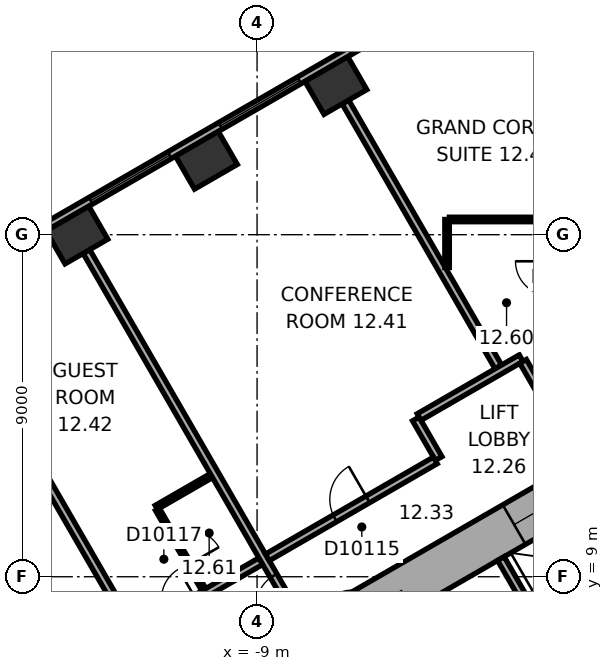
"""IFC4 building model, lengths in metres.
Left out: names, types, materials, properties, quantities, classifications, styles, units other than length and angle.
Written with IfcOpenShell. Run it as: python <this file> out.ifc"""

import sys

from ifc_helpers import new_model, si_unit, direction, frame, frame_2d, origin, origin_2d, place, context, subcontext, project, spatial, rectangle, extrude, element, fill, save


model = new_model("IFC4")
c1 = context("Model", 3, precision=1e-05, world=origin(), true_north=direction((0.0, 1.0)))
c2 = subcontext(c1, "Body", "Model", "MODEL_VIEW")
j1 = project(units=[si_unit("LENGTHUNIT", "METRE"), si_unit("PLANEANGLEUNIT", "RADIAN")], contexts=[c1])
p1 = place(None, origin())
s1 = spatial("IfcSite", under=j1, at=p1, CompositionType="ELEMENT")
p2 = place(p1, origin())
s2 = spatial("IfcBuilding", under=s1, at=p2, CompositionType="ELEMENT")
p3 = place(p2, frame((0.0, 0.0, 60.5)))
s3 = spatial("IfcBuildingStorey", under=s2, at=p3, CompositionType="ELEMENT", Elevation=60.5)
for number, where, z_axis, x_axis in (
    (1, (-6.926, 21.925, 0.0), (0.0, 0.0, 1.0), (-0.866, -0.5, 0.0)),
    (2, (-10.333, 19.957, 0.0), (0.0, 0.0, 1.0), (-0.866, -0.5, 0.0)),
    (3, (-13.74, 17.99, 0.0), (0.0, 0.0, 1.0), (-0.866, -0.5, 0.0)),
):
    element("IfcColumn", number, at=place(p3, frame(where, z_axis=z_axis, x_axis=x_axis)), inside=s3, PredefinedType="COLUMN", context=c2, shape_type="SweptSolid", body=[
        extrude(rectangle(XDim=1.3, YDim=1.0, at=origin_2d()), origin(), (0.0, 0.0, 1.0), 3.3),
    ])
p4 = place(p3, frame((0.3, 11.836, 0.0), z_axis=(0.0, 0.0, 1.0), x_axis=(-0.866021384402, -0.500006961711, 0.0)))
e4 = element("IfcWall", 4, at=p4, inside=s3, PredefinedType="SHEAR", context=c2, shape_type="SweptSolid", body=[
    extrude(rectangle(XDim=12.355, YDim=1.2, at=frame_2d((6.178, 0.0))), origin(), (0.0, 0.0, 1.0), 3.3),
])
p5 = place(p4, frame((6.378, 0.0, 0.0)))
e5 = element("IfcOpeningElement", 5, at=p5, cuts=e4, PredefinedType="OPENING", context=c2, shape_type="SweptSolid", body=[
    extrude(rectangle(XDim=1.5, YDim=2.1, at=frame_2d((0.75, 1.05))), frame((0.0, 0.61, 0.0), z_axis=(0.0, -1.0, 0.0), x_axis=(1.0, 0.0, 0.0)), (0.0, 0.0, 1.0), 1.22),
])
p6 = place(p4, frame((1.828, 0.0, 0.0)))
e6 = element("IfcOpeningElement", 6, at=p6, cuts=e4, PredefinedType="OPENING", context=c2, shape_type="SweptSolid", body=[
    extrude(rectangle(XDim=1.1, YDim=2.1, at=frame_2d((0.55, 1.05))), frame((0.0, 0.61, 0.0), z_axis=(0.0, -1.0, 0.0), x_axis=(1.0, 0.0, 0.0)), (0.0, 0.0, 1.0), 1.22),
])
p7 = place(p3, frame((-3.136, 24.805, 0.0), z_axis=(0.0, 0.0, 1.0), x_axis=(-0.866028291626, -0.499994998079, 0.0)))
e7 = element("IfcWall", 7, at=p7, inside=s3, PredefinedType="STANDARD", context=c2, shape_type="SweptSolid", body=[
    extrude(rectangle(XDim=21.246, YDim=0.2, at=frame_2d((10.623, 0.0))), origin(), (0.0, 0.0, 1.0), 3.3),
])
p8 = place(p7, frame((1.555, 0.0, 0.8)))
e8 = element("IfcOpeningElement", 8, at=p8, cuts=e7, PredefinedType="OPENING", context=c2, shape_type="SweptSolid", body=[
    extrude(rectangle(XDim=2.4, YDim=1.7, at=frame_2d((1.2, 0.85))), frame((0.0, 0.11, 0.0), z_axis=(0.0, -1.0, 0.0), x_axis=(1.0, 0.0, 0.0)), (0.0, 0.0, 1.0), 0.22),
])
p9 = place(p7, frame((5.489, 0.0, 0.8)))
e9 = element("IfcOpeningElement", 9, at=p9, cuts=e7, PredefinedType="OPENING", context=c2, shape_type="SweptSolid", body=[
    extrude(rectangle(XDim=2.4, YDim=1.7, at=frame_2d((1.2, 0.85))), frame((0.0, 0.11, 0.0), z_axis=(0.0, -1.0, 0.0), x_axis=(1.0, 0.0, 0.0)), (0.0, 0.0, 1.0), 0.22),
])
p10 = place(p7, frame((9.424, 0.0, 0.8)))
e10 = element("IfcOpeningElement", 10, at=p10, cuts=e7, PredefinedType="OPENING", context=c2, shape_type="SweptSolid", body=[
    extrude(rectangle(XDim=2.4, YDim=1.7, at=frame_2d((1.2, 0.85))), frame((0.0, 0.11, 0.0), z_axis=(0.0, -1.0, 0.0), x_axis=(1.0, 0.0, 0.0)), (0.0, 0.0, 1.0), 0.22),
])
p11 = place(p7, frame((13.358, 0.0, 0.8)))
e11 = element("IfcOpeningElement", 11, at=p11, cuts=e7, PredefinedType="OPENING", context=c2, shape_type="SweptSolid", body=[
    extrude(rectangle(XDim=2.4, YDim=1.7, at=frame_2d((1.2, 0.85))), frame((0.0, 0.11, 0.0), z_axis=(0.0, -1.0, 0.0), x_axis=(1.0, 0.0, 0.0)), (0.0, 0.0, 1.0), 0.22),
])
p12 = place(p7, frame((17.293, 0.0, 0.8)))
e12 = element("IfcOpeningElement", 12, at=p12, cuts=e7, PredefinedType="OPENING", context=c2, shape_type="SweptSolid", body=[
    extrude(rectangle(XDim=2.4, YDim=1.7, at=frame_2d((1.2, 0.85))), frame((0.0, 0.11, 0.0), z_axis=(0.0, -1.0, 0.0), x_axis=(1.0, 0.0, 0.0)), (0.0, 0.0, 1.0), 0.22),
])
p13 = place(p3, frame((0.803, 9.009, 0.0), z_axis=(0.0, 0.0, 1.0), x_axis=(-0.866028230842, -0.499995103361, 0.0)))
e13 = element("IfcWall", 13, at=p13, inside=s3, PredefinedType="PARTITIONING", context=c2, shape_type="SweptSolid", body=[
    extrude(rectangle(XDim=5.4, YDim=0.2, at=frame_2d((2.7, 0.0))), origin(), (0.0, 0.0, 1.0), 3.05),
])
p14 = place(p3, frame((-1.485, 7.572, 0.0), z_axis=(0.0, 0.0, 1.0), x_axis=(-0.50002983664, 0.866008176907, 0.0)))
e14 = element("IfcWall", 14, at=p14, inside=s3, PredefinedType="PARTITIONING", context=c2, shape_type="SweptSolid", body=[
    extrude(rectangle(XDim=2.2, YDim=0.2, at=frame_2d((1.1, 0.0))), origin(), (0.0, 0.0, 1.0), 3.05),
])
p15 = place(p3, frame((-16.898, 15.59, 0.0), z_axis=(0.0, 0.0, 1.0), x_axis=(0.500023458698, -0.866011859475, 0.0)))
e15 = element("IfcWall", 15, at=p15, inside=s3, PredefinedType="PARTITIONING", context=c2, shape_type="SweptSolid", body=[
    extrude(rectangle(XDim=9.572, YDim=0.2, at=frame_2d((4.786, 0.0))), origin(), (0.0, 0.0, 1.0), 3.05),
])
p16 = place(p3, frame((-11.651, 10.825, 0.0), z_axis=(0.0, 0.0, 1.0), x_axis=(0.865998477143, 0.500046635412, 0.0)))
e16 = element("IfcWall", 16, at=p16, inside=s3, PredefinedType="PARTITIONING", context=c2, shape_type="SweptSolid", body=[
    extrude(rectangle(XDim=1.673, YDim=0.12, at=frame_2d((0.836, 0.0))), origin(), (0.0, 0.0, 1.0), 3.05),
])
p17 = place(p3, frame((-10.401, 8.66, 0.0), z_axis=(0.0, 0.0, 1.0), x_axis=(-0.500077547548, 0.865980627057, 0.0)))
e17 = element("IfcWall", 17, at=p17, inside=s3, PredefinedType="PARTITIONING", context=c2, shape_type="SweptSolid", body=[
    extrude(rectangle(XDim=2.44, YDim=0.12, at=frame_2d((1.22, 0.0))), origin(), (0.0, 0.0, 1.0), 3.05),
])
p18 = place(p17, frame((0.77, 0.0, 0.0)))
e18 = element("IfcOpeningElement", 18, at=p18, cuts=e17, PredefinedType="OPENING", context=c2, shape_type="SweptSolid", body=[
    extrude(rectangle(XDim=0.9, YDim=2.1, at=frame_2d((0.45, 1.05))), frame((0.0, 0.07, 0.0), z_axis=(0.0, -1.0, 0.0), x_axis=(1.0, 0.0, 0.0)), (0.0, 0.0, 1.0), 0.14),
])
p19 = place(p3, frame((-8.902, 9.41, 0.0), z_axis=(0.0, 0.0, 1.0), x_axis=(-0.866014299198, -0.500019233215, 0.0)))
e19 = element("IfcWall", 19, at=p19, inside=s3, PredefinedType="PARTITIONING", context=c2, shape_type="SweptSolid", body=[
    extrude(rectangle(XDim=3.133, YDim=0.2, at=frame_2d((1.567, 0.0))), origin(), (0.0, 0.0, 1.0), 3.05),
])
p20 = place(p19, frame((1.978, 0.0, 0.0)))
e20 = element("IfcOpeningElement", 20, at=p20, cuts=e19, PredefinedType="OPENING", context=c2, shape_type="SweptSolid", body=[
    extrude(rectangle(XDim=0.9, YDim=2.1, at=frame_2d((0.45, 1.05))), frame((0.0, 0.11, 0.0), z_axis=(0.0, -1.0, 0.0), x_axis=(1.0, 0.0, 0.0)), (0.0, 0.0, 1.0), 0.22),
])
p21 = place(p3, frame((-7.865, 7.814, 0.0), z_axis=(0.0, 0.0, 1.0), x_axis=(-0.500004234368, 0.866022959057, 0.0)))
e21 = element("IfcWall", 21, at=p21, inside=s3, PredefinedType="PARTITIONING", context=c2, shape_type="SweptSolid", body=[
    extrude(rectangle(XDim=11.25, YDim=0.2, at=frame_2d((5.625, 0.0))), origin(), (0.0, 0.0, 1.0), 3.05),
])
p22 = place(p21, frame((0.5, 0.0, 0.0)))
e22 = element("IfcOpeningElement", 22, at=p22, cuts=e21, PredefinedType="OPENING", context=c2, shape_type="SweptSolid", body=[
    extrude(rectangle(XDim=0.9, YDim=2.1, at=frame_2d((0.45, 1.05))), frame((0.0, 0.11, 0.0), z_axis=(0.0, -1.0, 0.0), x_axis=(1.0, 0.0, 0.0)), (0.0, 0.0, 1.0), 0.22),
])
p23 = place(p3, frame((-6.676, 21.492, 0.0), z_axis=(0.0, 0.0, 1.0), x_axis=(0.500011263043, -0.866018900966, 0.0)))
e23 = element("IfcWall", 23, at=p23, inside=s3, PredefinedType="PARTITIONING", context=c2, shape_type="SweptSolid", body=[
    extrude(rectangle(XDim=8.049, YDim=0.2, at=frame_2d((4.024, 0.0))), origin(), (0.0, 0.0, 1.0), 3.05),
])
p24 = place(p3, frame((-4.823, 13.152, 0.0), z_axis=(0.0, 0.0, 1.0), x_axis=(0.499986357472, -0.866033280158, 0.0)))
e24 = element("IfcWall", 24, at=p24, inside=s3, PredefinedType="PARTITIONING", context=c2, shape_type="SweptSolid", body=[
    extrude(rectangle(XDim=1.201, YDim=0.2, at=frame_2d((0.601, 0.0))), origin(), (0.0, 0.0, 1.0), 3.05),
])
p25 = place(p3, frame((-4.309, 12.061, 0.0), z_axis=(0.0, 0.0, 1.0), x_axis=(-0.866020679205, -0.500008183122, 0.0)))
e25 = element("IfcWall", 25, at=p25, inside=s3, PredefinedType="PARTITIONING", context=c2, shape_type="SweptSolid", body=[
    extrude(rectangle(XDim=5.104, YDim=0.2, at=frame_2d((2.552, 0.0))), origin(), (0.0, 0.0, 1.0), 3.05),
])
p26 = place(p25, frame((2.052, 0.0, 0.0)))
e26 = element("IfcOpeningElement", 26, at=p26, cuts=e25, PredefinedType="OPENING", context=c2, shape_type="SweptSolid", body=[
    extrude(rectangle(XDim=1.0, YDim=2.1, at=frame_2d((0.5, 1.05))), frame((0.0, 0.11, 0.0), z_axis=(0.0, -1.0, 0.0), x_axis=(1.0, 0.0, 0.0)), (0.0, 0.0, 1.0), 0.22),
])
p27 = place(p3, frame((-4.0, 17.137, 0.0), z_axis=(0.0, 0.0, 1.0), x_axis=(0.0, 1.0, 0.0)))
e27 = element("IfcWall", 27, at=p27, inside=s3, PredefinedType="PARTITIONING", context=c2, shape_type="SweptSolid", body=[
    extrude(rectangle(XDim=1.263, YDim=0.12, at=frame_2d((0.632, 0.0))), origin(), (0.0, 0.0, 1.0), 3.05),
])
p28 = place(p3, frame((-3.94, 18.401, 0.0), z_axis=(0.0, 0.0, 1.0), x_axis=(1.0, 0.0, 0.0)))
e28 = element("IfcWall", 28, at=p28, inside=s3, PredefinedType="PARTITIONING", context=c2, shape_type="SweptSolid", body=[
    extrude(rectangle(XDim=2.64, YDim=0.12, at=frame_2d((1.32, 0.0))), origin(), (0.0, 0.0, 1.0), 3.05),
])
p29 = place(p3, frame((-2.05, 14.752, 0.0), z_axis=(0.0, 0.0, 1.0), x_axis=(-0.866030936828, -0.499990416364, 0.0)))
e29 = element("IfcWall", 29, at=p29, inside=s3, PredefinedType="PARTITIONING", context=c2, shape_type="SweptSolid", body=[
    extrude(rectangle(XDim=3.102, YDim=0.2, at=frame_2d((1.551, 0.0))), origin(), (0.0, 0.0, 1.0), 3.05),
])
p30 = place(p3, frame((-1.449, 13.712, 0.0), z_axis=(0.0, 0.0, 1.0), x_axis=(-0.499978356969, 0.866037899034, 0.0)))
e30 = element("IfcWall", 30, at=p30, inside=s3, PredefinedType="PARTITIONING", context=c2, shape_type="SweptSolid", body=[
    extrude(rectangle(XDim=1.101, YDim=0.2, at=frame_2d((0.551, 0.0))), origin(), (0.0, 0.0, 1.0), 3.05),
])
p31 = place(p3, frame((-1.3, 15.301, 0.0), z_axis=(0.0, 0.0, 1.0), x_axis=(-1.0, 0.0, 0.0)))
e31 = element("IfcWall", 31, at=p31, inside=s3, PredefinedType="PARTITIONING", context=c2, shape_type="SweptSolid", body=[
    extrude(rectangle(XDim=1.661, YDim=0.12, at=frame_2d((0.831, 0.0))), origin(), (0.0, 0.0, 1.0), 3.05),
])
p32 = place(p9, origin())
e32 = element("IfcWindow", 32, at=p32, inside=s3, PartitioningType="SINGLE_PANEL", PredefinedType="WINDOW", context=c2, shape_type="SweptSolid", body=[
    extrude(rectangle(XDim=2.4, YDim=1.7, at=frame_2d((1.2, 0.85))), frame((0.0, 0.03, 0.0), z_axis=(0.0, -1.0, 0.0), x_axis=(1.0, 0.0, 0.0)), (0.0, 0.0, 1.0), 0.06),
])
fill(e9, e32)
p33 = place(p10, origin())
e33 = element("IfcWindow", 33, at=p33, inside=s3, PartitioningType="SINGLE_PANEL", PredefinedType="WINDOW", context=c2, shape_type="SweptSolid", body=[
    extrude(rectangle(XDim=2.4, YDim=1.7, at=frame_2d((1.2, 0.85))), frame((0.0, 0.03, 0.0), z_axis=(0.0, -1.0, 0.0), x_axis=(1.0, 0.0, 0.0)), (0.0, 0.0, 1.0), 0.06),
])
fill(e10, e33)
p34 = place(p5, origin())
e34 = element("IfcDoor", 34, at=p34, inside=s3, OperationType="DOUBLE_DOOR_SINGLE_SWING", PredefinedType="DOOR", context=c2, shape_type="SweptSolid", body=[
    extrude(rectangle(XDim=1.5, YDim=2.1, at=frame_2d((0.75, 1.05))), frame((0.0, 0.025, 0.0), z_axis=(0.0, -1.0, 0.0), x_axis=(1.0, 0.0, 0.0)), (0.0, 0.0, 1.0), 0.05),
])
fill(e5, e34)
p35 = place(p6, origin())
e35 = element("IfcDoor", 35, at=p35, inside=s3, OperationType="DOUBLE_DOOR_SLIDING", PredefinedType="DOOR", context=c2, shape_type="SweptSolid", body=[
    extrude(rectangle(XDim=1.1, YDim=2.1, at=frame_2d((0.55, 1.05))), frame((0.0, 0.025, 0.0), z_axis=(0.0, -1.0, 0.0), x_axis=(1.0, 0.0, 0.0)), (0.0, 0.0, 1.0), 0.05),
])
fill(e6, e35)
p36 = place(p26, origin())
e36 = element("IfcDoor", 36, at=p36, inside=s3, OperationType="SINGLE_SWING_LEFT", PredefinedType="DOOR", context=c2, shape_type="SweptSolid", body=[
    extrude(rectangle(XDim=1.0, YDim=2.1, at=frame_2d((0.5, 1.05))), frame((0.0, 0.025, 0.0), z_axis=(0.0, -1.0, 0.0), x_axis=(1.0, 0.0, 0.0)), (0.0, 0.0, 1.0), 0.05),
])
fill(e26, e36)
p37 = place(p18, origin())
e37 = element("IfcDoor", 37, at=p37, inside=s3, OperationType="SINGLE_SWING_LEFT", PredefinedType="DOOR", context=c2, shape_type="SweptSolid", body=[
    extrude(rectangle(XDim=0.9, YDim=2.1, at=frame_2d((0.45, 1.05))), frame((0.0, 0.025, 0.0), z_axis=(0.0, -1.0, 0.0), x_axis=(1.0, 0.0, 0.0)), (0.0, 0.0, 1.0), 0.05),
])
fill(e18, e37)
p38 = place(p22, origin())
e38 = element("IfcDoor", 38, at=p38, inside=s3, OperationType="SINGLE_SWING_LEFT", PredefinedType="DOOR", context=c2, shape_type="SweptSolid", body=[
    extrude(rectangle(XDim=0.9, YDim=2.1, at=frame_2d((0.45, 1.05))), frame((0.0, 0.025, 0.0), z_axis=(0.0, -1.0, 0.0), x_axis=(1.0, 0.0, 0.0)), (0.0, 0.0, 1.0), 0.05),
])
fill(e22, e38)
save(model, sys.argv[1])
